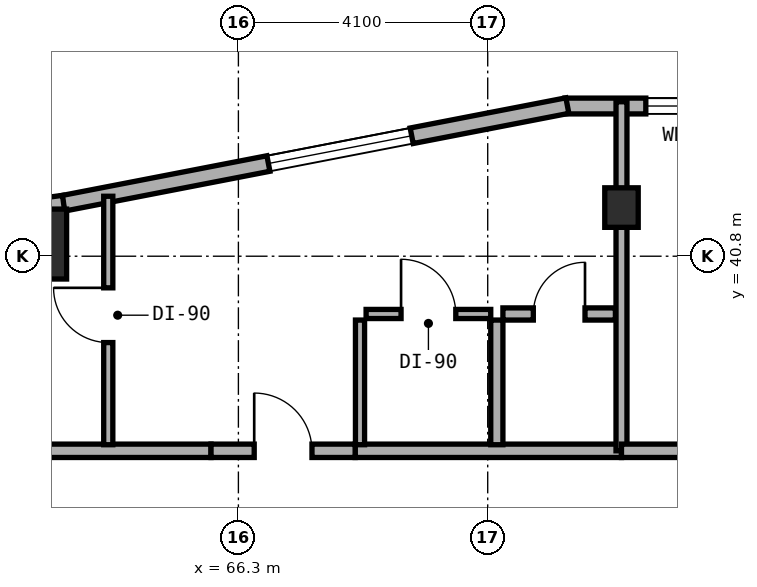
"""IFC4 building model, lengths in metres.
Left out: names, types, materials, properties, quantities, classifications, styles, units other than length and angle.
Written with IfcOpenShell. Run it as: python <this file> out.ifc"""

import sys

from ifc_helpers import new_model, si_unit, direction, frame, frame_2d, origin, origin_2d, place, context, subcontext, project, spatial, rectangle, extrude, element, fill, save


model = new_model("IFC4")
c1 = context("Model", 3, precision=1e-05, world=origin(), true_north=direction((0.0, 1.0)))
c2 = subcontext(c1, "Body", "Model", "MODEL_VIEW")
j1 = project(units=[si_unit("LENGTHUNIT", "METRE"), si_unit("PLANEANGLEUNIT", "RADIAN")], contexts=[c1])
p1 = place(None, origin())
s1 = spatial("IfcSite", under=j1, at=p1, CompositionType="ELEMENT")
p2 = place(p1, origin())
s2 = spatial("IfcBuilding", under=s1, at=p2, CompositionType="ELEMENT")
p3 = place(p2, frame((0.0, 0.0, 112.5)))
s3 = spatial("IfcBuildingStorey", under=s2, at=p3, CompositionType="ELEMENT", Elevation=112.5)
p4 = place(p3, frame((72.6, 41.6, 0.0), z_axis=(0.0, 0.0, 1.0), x_axis=(1.0, 0.0, 0.0)))
e1 = element("IfcColumn", 1, at=p4, inside=s3, PredefinedType="COLUMN", context=c2, shape_type="SweptSolid", body=[
    extrude(rectangle(XDim=0.55, YDim=0.65, at=origin_2d()), origin(), (0.0, 0.0, 1.0), 3.5),
])
p5 = place(p3, frame((63.0, 41.0, 0.0), z_axis=(0.0, 0.0, 1.0), x_axis=(1.0, 0.0, 0.0)))
e2 = element("IfcColumn", 2, at=p5, inside=s3, PredefinedType="COLUMN", context=c2, shape_type="SweptSolid", body=[
    extrude(rectangle(XDim=0.95, YDim=1.15, at=origin_2d()), origin(), (0.0, 0.0, 1.0), 3.5),
])
p6 = place(p3, frame((82.365, 43.27, 0.0), z_axis=(0.0, 0.0, 1.0), x_axis=(-1.0, 0.0, 0.0)))
e3 = element("IfcWall", 3, at=p6, inside=s3, PredefinedType="STANDARD", context=c2, shape_type="SweptSolid", body=[
    extrude(rectangle(XDim=10.695, YDim=0.26, at=frame_2d((5.348, 0.0))), origin(), (0.0, 0.0, 1.0), 3.25),
])
p7 = place(p6, frame((4.765, 0.0, 0.0)))
e4 = element("IfcOpeningElement", 4, at=p7, cuts=e3, PredefinedType="OPENING", context=c2, shape_type="SweptSolid", body=[
    extrude(rectangle(XDim=1.2, YDim=2.15, at=frame_2d((0.6, 1.075))), frame((0.0, 0.14, 0.0), z_axis=(0.0, -1.0, 0.0), x_axis=(1.0, 0.0, 0.0)), (0.0, 0.0, 1.0), 0.28),
])
p8 = place(p6, frame((1.077, 0.0, 0.8)))
e5 = element("IfcOpeningElement", 5, at=p8, cuts=e3, PredefinedType="OPENING", context=c2, shape_type="SweptSolid", body=[
    extrude(rectangle(XDim=2.4, YDim=1.6, at=frame_2d((1.2, 0.8))), frame((0.0, 0.14, 0.0), z_axis=(0.0, -1.0, 0.0), x_axis=(1.0, 0.0, 0.0)), (0.0, 0.0, 1.0), 0.28),
])
p9 = place(p6, frame((7.865, 0.0, 0.85)))
e6 = element("IfcOpeningElement", 6, at=p9, cuts=e3, PredefinedType="OPENING", context=c2, shape_type="SweptSolid", body=[
    extrude(rectangle(XDim=1.5, YDim=1.5, at=frame_2d((0.75, 0.75))), frame((0.0, 0.14, 0.0), z_axis=(0.0, -1.0, 0.0), x_axis=(1.0, 0.0, 0.0)), (0.0, 0.0, 1.0), 0.28),
])
p10 = place(p3, frame((71.71, 43.277, 0.0), z_axis=(0.0, 0.0, 1.0), x_axis=(-0.981733729692, -0.190260043057, 0.0)))
e7 = element("IfcWall", 7, at=p10, inside=s3, PredefinedType="STANDARD", context=c2, shape_type="SweptSolid", body=[
    extrude(rectangle(XDim=8.447, YDim=0.26, at=frame_2d((4.224, 0.0))), origin(), (0.0, 0.0, 1.0), 3.25),
])
p11 = place(p10, frame((2.608, 0.0, 0.8)))
e8 = element("IfcOpeningElement", 8, at=p11, cuts=e7, PredefinedType="OPENING", context=c2, shape_type="SweptSolid", body=[
    extrude(rectangle(XDim=2.4, YDim=1.6, at=frame_2d((1.2, 0.8))), frame((0.0, 0.14, 0.0), z_axis=(0.0, -1.0, 0.0), x_axis=(1.0, 0.0, 0.0)), (0.0, 0.0, 1.0), 0.28),
])
p12 = place(p3, frame((63.425, 41.672, 0.0), z_axis=(0.0, 0.0, 1.0), x_axis=(-0.991300187529, -0.13162043232, 0.0)))
e9 = element("IfcWall", 9, at=p12, inside=s3, PredefinedType="STANDARD", context=c2, shape_type="SweptSolid", body=[
    extrude(rectangle(XDim=0.677, YDim=0.26, at=frame_2d((0.338, 0.0))), origin(), (0.0, 0.0, 1.0), 3.25),
])
p13 = place(p3, frame((59.36, 37.6, 0.0), z_axis=(0.0, 0.0, 1.0), x_axis=(1.0, 0.0, 0.0)))
e10 = element("IfcWall", 10, at=p13, inside=s3, PredefinedType="SOLIDWALL", context=c2, shape_type="SweptSolid", body=[
    extrude(rectangle(XDim=6.49, YDim=0.22, at=frame_2d((3.245, 0.0))), origin(), (0.0, 0.0, 1.0), 2.945),
])
p14 = place(p3, frame((68.22, 37.6, 0.0), z_axis=(0.0, 0.0, 1.0), x_axis=(1.0, 0.0, 0.0)))
e11 = element("IfcWall", 11, at=p14, inside=s3, PredefinedType="SOLIDWALL", context=c2, shape_type="SweptSolid", body=[
    extrude(rectangle(XDim=4.38, YDim=0.22, at=frame_2d((2.19, 0.0))), origin(), (0.0, 0.0, 1.0), 2.825),
])
p15 = place(p3, frame((65.85, 37.6, 0.0), z_axis=(0.0, 0.0, 1.0), x_axis=(1.0, 0.0, 0.0)))
e12 = element("IfcWall", 12, at=p15, inside=s3, PredefinedType="SOLIDWALL", context=c2, shape_type="SweptSolid", body=[
    extrude(rectangle(XDim=2.37, YDim=0.22, at=frame_2d((1.185, 0.0))), origin(), (0.0, 0.0, 1.0), 3.22),
])
p16 = place(p15, frame((0.71, 0.0, 0.0)))
e13 = element("IfcOpeningElement", 13, at=p16, cuts=e12, PredefinedType="OPENING", context=c2, shape_type="SweptSolid", body=[
    extrude(rectangle(XDim=0.95, YDim=2.1, at=frame_2d((0.475, 1.05))), frame((0.0, 0.12, 0.0), z_axis=(0.0, -1.0, 0.0), x_axis=(1.0, 0.0, 0.0)), (0.0, 0.0, 1.0), 0.24),
])
p17 = place(p3, frame((64.16, 37.7, 0.0), z_axis=(0.0, 0.0, 1.0), x_axis=(0.0, 1.0, 0.0)))
e14 = element("IfcWall", 14, at=p17, inside=s3, PredefinedType="PARTITIONING", context=c2, shape_type="SweptSolid", body=[
    extrude(rectangle(XDim=4.086, YDim=0.15, at=frame_2d((2.043, 0.0))), origin(), (0.0, 0.0, 1.0), 2.945),
])
p18 = place(p17, frame((1.68, 0.0, 0.0)))
e15 = element("IfcOpeningElement", 15, at=p18, cuts=e14, PredefinedType="OPENING", context=c2, shape_type="SweptSolid", body=[
    extrude(rectangle(XDim=0.9, YDim=2.1, at=frame_2d((0.45, 1.05))), frame((0.0, 0.085, 0.0), z_axis=(0.0, -1.0, 0.0), x_axis=(1.0, 0.0, 0.0)), (0.0, 0.0, 1.0), 0.17),
])
p19 = place(p3, frame((70.55, 37.7, 0.0), z_axis=(0.0, 0.0, 1.0), x_axis=(0.0, 1.0, 0.0)))
e16 = element("IfcWall", 16, at=p19, inside=s3, PredefinedType="PLUMBINGWALL", context=c2, shape_type="SweptSolid", body=[
    extrude(rectangle(XDim=2.05, YDim=0.2, at=frame_2d((1.025, 0.0))), origin(), (0.0, 0.0, 1.0), 3.22),
])
p20 = place(p3, frame((68.3, 37.7, 0.0), z_axis=(0.0, 0.0, 1.0), x_axis=(0.0, 1.0, 0.0)))
e17 = element("IfcWall", 17, at=p20, inside=s3, PredefinedType="PARTITIONING", context=c2, shape_type="SweptSolid", body=[
    extrude(rectangle(XDim=2.05, YDim=0.15, at=frame_2d((1.025, 0.0))), origin(), (0.0, 0.0, 1.0), 3.22),
])
p21 = place(p3, frame((70.65, 39.85, 0.0), z_axis=(0.0, 0.0, 1.0), x_axis=(1.0, 0.0, 0.0)))
e18 = element("IfcWall", 18, at=p21, inside=s3, PredefinedType="PLUMBINGWALL", context=c2, shape_type="SweptSolid", body=[
    extrude(rectangle(XDim=1.85, YDim=0.2, at=frame_2d((0.925, 0.0))), origin(), (0.0, 0.0, 1.0), 3.22),
])
p22 = place(p21, frame((0.5, 0.0, 0.0)))
e19 = element("IfcOpeningElement", 19, at=p22, cuts=e18, PredefinedType="OPENING", context=c2, shape_type="SweptSolid", body=[
    extrude(rectangle(XDim=0.85, YDim=2.1, at=frame_2d((0.425, 1.05))), frame((0.0, 0.11, 0.0), z_axis=(0.0, -1.0, 0.0), x_axis=(1.0, 0.0, 0.0)), (0.0, 0.0, 1.0), 0.22),
])
p23 = place(p3, frame((68.4, 39.85, 0.0), z_axis=(0.0, 0.0, 1.0), x_axis=(1.0, 0.0, 0.0)))
e20 = element("IfcWall", 20, at=p23, inside=s3, PredefinedType="PARTITIONING", context=c2, shape_type="SweptSolid", body=[
    extrude(rectangle(XDim=2.05, YDim=0.15, at=frame_2d((1.025, 0.0))), origin(), (0.0, 0.0, 1.0), 3.22),
])
p24 = place(p23, frame((0.575, 0.0, 0.0)))
e21 = element("IfcOpeningElement", 21, at=p24, cuts=e20, PredefinedType="OPENING", context=c2, shape_type="SweptSolid", body=[
    extrude(rectangle(XDim=0.9, YDim=2.1, at=frame_2d((0.45, 1.05))), frame((0.0, 0.085, 0.0), z_axis=(0.0, -1.0, 0.0), x_axis=(1.0, 0.0, 0.0)), (0.0, 0.0, 1.0), 0.17),
])
p25 = place(p3, frame((72.6, 37.6, 0.0), z_axis=(0.0, 0.0, 1.0), x_axis=(0.0, 1.0, 0.0)))
e22 = element("IfcWall", 22, at=p25, inside=s3, PredefinedType="SOLIDWALL", context=c2, shape_type="SweptSolid", body=[
    extrude(rectangle(XDim=5.74, YDim=0.18, at=frame_2d((2.87, 0.0))), origin(), (0.0, 0.0, 1.0), 2.825),
])
p26 = place(p3, frame((72.6, 37.6, 0.0), z_axis=(0.0, 0.0, 1.0), x_axis=(1.0, 0.0, 0.0)))
e23 = element("IfcWall", 23, at=p26, inside=s3, PredefinedType="SOLIDWALL", context=c2, shape_type="SweptSolid", body=[
    extrude(rectangle(XDim=6.68, YDim=0.22, at=frame_2d((3.34, 0.0))), origin(), (0.0, 0.0, 1.0), 2.825),
])
p27 = place(p9, origin())
e24 = element("IfcWindow", 24, at=p27, inside=s3, PartitioningType="SINGLE_PANEL", PredefinedType="WINDOW", context=c2, shape_type="SweptSolid", body=[
    extrude(rectangle(XDim=1.5, YDim=1.5, at=frame_2d((0.75, 0.75))), frame((0.0, 0.03, 0.0), z_axis=(0.0, -1.0, 0.0), x_axis=(1.0, 0.0, 0.0)), (0.0, 0.0, 1.0), 0.06),
])
fill(e6, e24)
p28 = place(p11, origin())
e25 = element("IfcWindow", 25, at=p28, inside=s3, PartitioningType="SINGLE_PANEL", PredefinedType="WINDOW", context=c2, shape_type="SweptSolid", body=[
    extrude(rectangle(XDim=2.4, YDim=1.6, at=frame_2d((1.2, 0.8))), frame((0.0, 0.03, 0.0), z_axis=(0.0, -1.0, 0.0), x_axis=(1.0, 0.0, 0.0)), (0.0, 0.0, 1.0), 0.06),
])
fill(e8, e25)
p29 = place(p16, origin())
e26 = element("IfcDoor", 26, at=p29, inside=s3, OperationType="SINGLE_SWING_LEFT", PredefinedType="DOOR", context=c2, shape_type="SweptSolid", body=[
    extrude(rectangle(XDim=0.95, YDim=2.1, at=frame_2d((0.475, 1.05))), frame((0.0, 0.025, 0.0), z_axis=(0.0, -1.0, 0.0), x_axis=(1.0, 0.0, 0.0)), (0.0, 0.0, 1.0), 0.05),
])
fill(e13, e26)
p30 = place(p18, origin())
e27 = element("IfcDoor", 27, at=p30, inside=s3, OperationType="SINGLE_SWING_RIGHT", PredefinedType="DOOR", context=c2, shape_type="SweptSolid", body=[
    extrude(rectangle(XDim=0.9, YDim=2.1, at=frame_2d((0.45, 1.05))), frame((0.0, 0.025, 0.0), z_axis=(0.0, -1.0, 0.0), x_axis=(1.0, 0.0, 0.0)), (0.0, 0.0, 1.0), 0.05),
])
fill(e15, e27)
p31 = place(p22, origin())
e28 = element("IfcDoor", 28, at=p31, inside=s3, OperationType="SINGLE_SWING_RIGHT", PredefinedType="DOOR", context=c2, shape_type="SweptSolid", body=[
    extrude(rectangle(XDim=0.85, YDim=2.1, at=frame_2d((0.425, 1.05))), frame((0.0, 0.025, 0.0), z_axis=(0.0, -1.0, 0.0), x_axis=(1.0, 0.0, 0.0)), (0.0, 0.0, 1.0), 0.05),
])
fill(e19, e28)
p32 = place(p24, origin())
e29 = element("IfcDoor", 29, at=p32, inside=s3, OperationType="SINGLE_SWING_LEFT", PredefinedType="DOOR", context=c2, shape_type="SweptSolid", body=[
    extrude(rectangle(XDim=0.9, YDim=2.1, at=frame_2d((0.45, 1.05))), frame((0.0, 0.025, 0.0), z_axis=(0.0, -1.0, 0.0), x_axis=(1.0, 0.0, 0.0)), (0.0, 0.0, 1.0), 0.05),
])
fill(e21, e29)
save(model, sys.argv[1])
